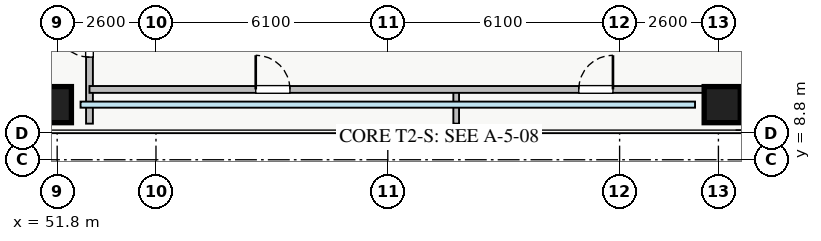
"""IFC4 building model, lengths in metres.
Left out: names, types, materials, properties, quantities, classifications, styles, units other than length and angle.
Written with IfcOpenShell. Run it as: python <this file> out.ifc"""

import sys

from ifc_helpers import new_model, si_unit, direction, frame, frame_2d, origin, origin_2d, place, context, subcontext, project, spatial, rectangle, extrude, source, transform, mapped, element, fill, save


model = new_model("IFC4")
c1 = context("Model", 3, precision=1e-05, world=origin(), true_north=direction((0.0, 1.0)))
c2 = subcontext(c1, "Body", "Model", "MODEL_VIEW")
j1 = project(units=[si_unit("LENGTHUNIT", "METRE"), si_unit("PLANEANGLEUNIT", "RADIAN")], contexts=[c1])
p1 = place(None, origin())
s1 = spatial("IfcSite", under=j1, at=p1, CompositionType="ELEMENT")
p2 = place(p1, origin())
s2 = spatial("IfcBuilding", under=s1, at=p2, CompositionType="ELEMENT")
p3 = place(p2, frame((0.0, 0.0, 53.5)))
s3 = spatial("IfcBuildingStorey", under=s2, at=p3, CompositionType="ELEMENT", Elevation=53.5)
m1 = source(origin(), c2, "Body", "SweptSolid", [
    extrude(rectangle(XDim=0.95, YDim=0.95, at=origin_2d()), origin(), (0.0, 0.0, 1.0), 3.25),
])
for number, where, z_axis, x_axis in (
    (1, (51.7, 10.25, 0.0), (0.0, 0.0, 1.0), (1.0, 0.0, 0.0)),
    (2, (69.3, 10.25, 0.0), (0.0, 0.0, 1.0), (1.0, 0.0, 0.0)),
):
    element("IfcColumn", number, at=place(p3, frame(where, z_axis=z_axis, x_axis=x_axis)), inside=s3, PredefinedType="COLUMN", context=c2, shape_type="MappedRepresentation", body=[
        mapped(m1, transform((0.0, 0.0, 0.0), x_axis=(1.0, 0.0, 0.0), y_axis=(0.0, 1.0, 0.0), z_axis=(0.0, 0.0, 1.0), scale=1.0)),
    ])
p4 = place(p3, frame((52.65, 9.75, 0.0), z_axis=(0.0, 0.0, 1.0), x_axis=(0.0, 1.0, 0.0)))
e3 = element("IfcWall", 3, at=p4, inside=s3, PredefinedType="PARTITIONING", context=c2, shape_type="SweptSolid", body=[
    extrude(rectangle(XDim=26.5, YDim=0.18, at=frame_2d((13.25, 0.0))), origin(), (0.0, 0.0, 1.0), 3.07),
])
p5 = place(p4, frame((23.85, 0.0, 0.0)))
e4 = element("IfcOpeningElement", 4, at=p5, cuts=e3, PredefinedType="OPENING", context=c2, shape_type="SweptSolid", body=[
    extrude(rectangle(XDim=0.9, YDim=2.05, at=frame_2d((0.45, 1.025))), frame((0.0, 0.1, 0.0), z_axis=(0.0, -1.0, 0.0), x_axis=(1.0, 0.0, 0.0)), (0.0, 0.0, 1.0), 0.2),
])
p6 = place(p4, frame((1.75, 0.0, 0.0)))
e5 = element("IfcOpeningElement", 5, at=p6, cuts=e3, PredefinedType="OPENING", context=c2, shape_type="SweptSolid", body=[
    extrude(rectangle(XDim=0.9, YDim=2.05, at=frame_2d((0.45, 1.025))), frame((0.0, 0.1, 0.0), z_axis=(0.0, -1.0, 0.0), x_axis=(1.0, 0.0, 0.0)), (0.0, 0.0, 1.0), 0.2),
])
p7 = place(p4, frame((5.145, 0.0, 0.0)))
e6 = element("IfcOpeningElement", 6, at=p7, cuts=e3, PredefinedType="OPENING", context=c2, shape_type="SweptSolid", body=[
    extrude(rectangle(XDim=1.0, YDim=2.05, at=frame_2d((0.5, 1.025))), frame((0.0, 0.1, 0.0), z_axis=(0.0, -1.0, 0.0), x_axis=(1.0, 0.0, 0.0)), (0.0, 0.0, 1.0), 0.2),
])
p8 = place(p4, frame((14.39, 0.0, 0.0)))
e7 = element("IfcOpeningElement", 7, at=p8, cuts=e3, PredefinedType="OPENING", context=c2, shape_type="SweptSolid", body=[
    extrude(rectangle(XDim=1.0, YDim=2.05, at=frame_2d((0.5, 1.025))), frame((0.0, 0.1, 0.0), z_axis=(0.0, -1.0, 0.0), x_axis=(1.0, 0.0, 0.0)), (0.0, 0.0, 1.0), 0.2),
])
for number, where, z_axis, x_axis in (
    (8, (62.3, 9.75, 0.0), (0.0, 0.0, 1.0), (0.0, 1.0, 0.0)),
    (9, (69.65, 9.75, 0.0), (0.0, 0.0, 1.0), (0.0, 1.0, 0.0)),
):
    element("IfcWall", number, at=place(p3, frame(where, z_axis=z_axis, x_axis=x_axis)), inside=s3, PredefinedType="PARTITIONING", context=c2, shape_type="SweptSolid", body=[
        extrude(rectangle(XDim=0.9, YDim=0.15, at=frame_2d((0.45, 0.0))), origin(), (0.0, 0.0, 1.0), 3.07),
    ])
p9 = place(p3, frame((52.65, 10.65, 0.0), z_axis=(0.0, 0.0, 1.0), x_axis=(1.0, 0.0, 0.0)))
e10 = element("IfcWall", 10, at=p9, inside=s3, PredefinedType="PARTITIONING", context=c2, shape_type="SweptSolid", body=[
    extrude(rectangle(XDim=17.0, YDim=0.18, at=frame_2d((8.5, 0.0))), origin(), (0.0, 0.0, 1.0), 3.07),
])
p10 = place(p9, frame((4.375, 0.0, 0.0)))
e11 = element("IfcOpeningElement", 11, at=p10, cuts=e10, PredefinedType="OPENING", context=c2, shape_type="SweptSolid", body=[
    extrude(rectangle(XDim=0.9, YDim=2.05, at=frame_2d((0.45, 1.025))), frame((0.0, 0.1, 0.0), z_axis=(0.0, -1.0, 0.0), x_axis=(1.0, 0.0, 0.0)), (0.0, 0.0, 1.0), 0.2),
])
p11 = place(p9, frame((12.875, 0.0, 0.0)))
e12 = element("IfcOpeningElement", 12, at=p11, cuts=e10, PredefinedType="OPENING", context=c2, shape_type="SweptSolid", body=[
    extrude(rectangle(XDim=0.9, YDim=2.05, at=frame_2d((0.45, 1.025))), frame((0.0, 0.1, 0.0), z_axis=(0.0, -1.0, 0.0), x_axis=(1.0, 0.0, 0.0)), (0.0, 0.0, 1.0), 0.2),
])
m2 = source(origin(), c2, "Body", "SweptSolid", [
    extrude(rectangle(XDim=0.9, YDim=2.05, at=frame_2d((0.45, 1.025))), frame((0.0, 0.025, 0.0), z_axis=(0.0, -1.0, 0.0), x_axis=(1.0, 0.0, 0.0)), (0.0, 0.0, 1.0), 0.05),
])
p12 = place(p6, origin())
e13 = element("IfcDoor", 13, at=p12, inside=s3, OperationType="SINGLE_SWING_RIGHT", PredefinedType="DOOR", context=c2, shape_type="MappedRepresentation", body=[
    mapped(m2, transform((0.0, 0.0, 0.0), x_axis=(1.0, 0.0, 0.0), y_axis=(0.0, 1.0, 0.0), z_axis=(0.0, 0.0, 1.0), scale=1.0)),
])
fill(e5, e13)
p13 = place(p10, origin())
e14 = element("IfcDoor", 14, at=p13, inside=s3, OperationType="SINGLE_SWING_LEFT", PredefinedType="DOOR", context=c2, shape_type="MappedRepresentation", body=[
    mapped(m2, transform((0.0, 0.0, 0.0), x_axis=(1.0, 0.0, 0.0), y_axis=(0.0, 1.0, 0.0), z_axis=(0.0, 0.0, 1.0), scale=1.0)),
])
fill(e11, e14)
p14 = place(p11, origin())
e15 = element("IfcDoor", 15, at=p14, inside=s3, OperationType="SINGLE_SWING_RIGHT", PredefinedType="DOOR", context=c2, shape_type="MappedRepresentation", body=[
    mapped(m2, transform((0.0, 0.0, 0.0), x_axis=(1.0, 0.0, 0.0), y_axis=(0.0, 1.0, 0.0), z_axis=(0.0, 0.0, 1.0), scale=1.0)),
])
fill(e12, e15)
save(model, sys.argv[1])
